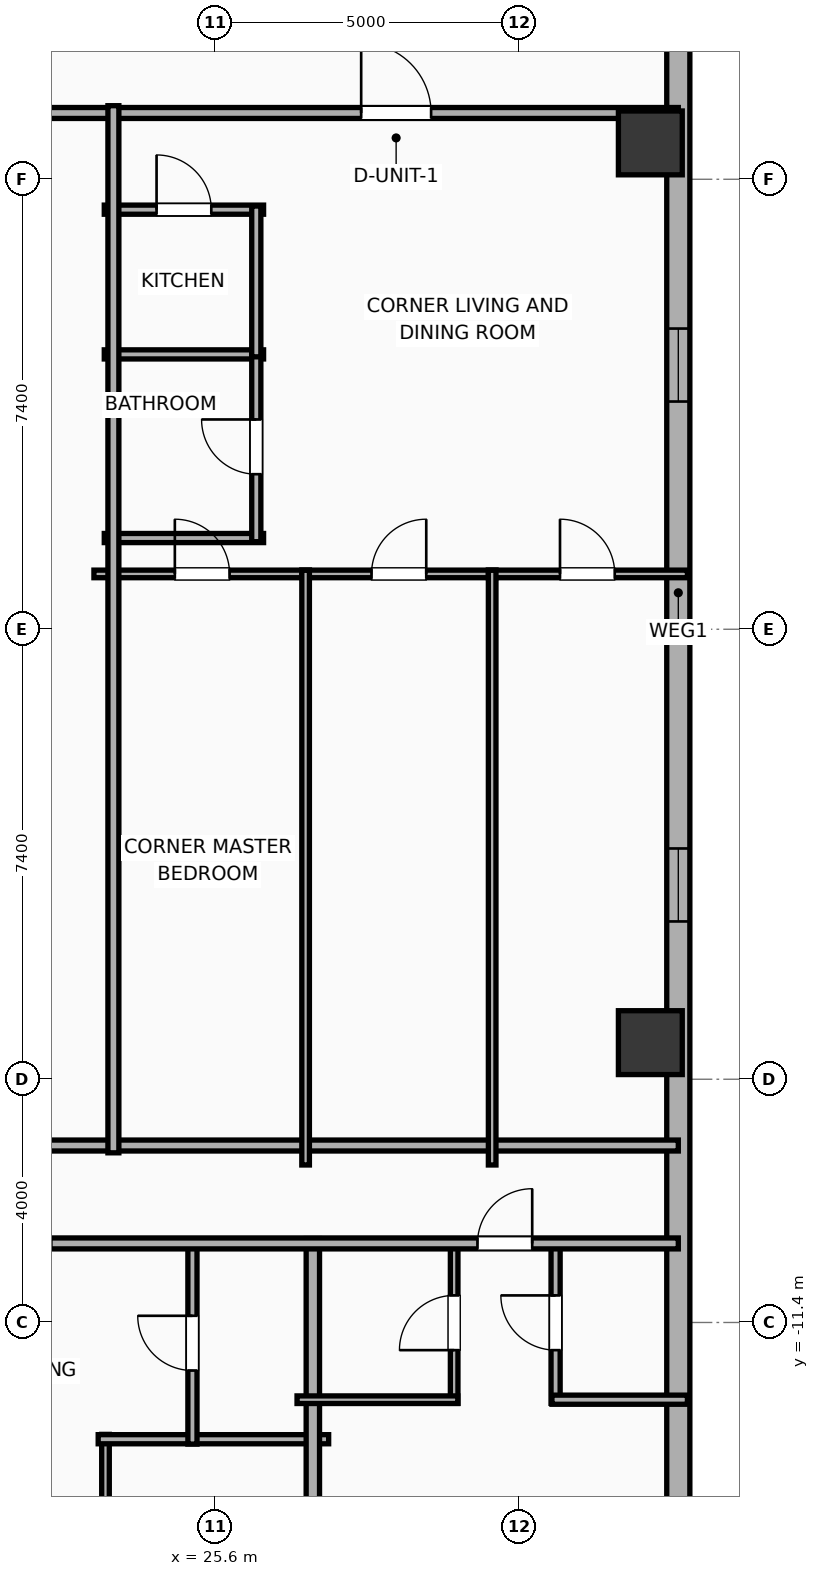
"""IFC4 building model, lengths in metres.
Left out: names, types, materials, properties, quantities, classifications, styles, units other than length and angle.
Written with IfcOpenShell. Run it as: python <this file> out.ifc"""

import sys

from ifc_helpers import new_model, si_unit, direction, frame, frame_2d, origin, origin_2d, place, context, subcontext, project, spatial, rectangle, hollow_rectangle, extrude, element, fill, save


model = new_model("IFC4")
c1 = context("Model", 3, precision=1e-05, world=origin(), true_north=direction((0.0, 1.0)))
c2 = subcontext(c1, "Body", "Model", "MODEL_VIEW")
j1 = project(units=[si_unit("LENGTHUNIT", "METRE"), si_unit("PLANEANGLEUNIT", "RADIAN")], contexts=[c1])
p1 = place(None, origin())
s1 = spatial("IfcSite", under=j1, at=p1, CompositionType="ELEMENT")
p2 = place(p1, origin())
s2 = spatial("IfcBuilding", under=s1, at=p2, CompositionType="ELEMENT")
p3 = place(p2, frame((0.0, 0.0, 97.5)))
s3 = spatial("IfcBuildingStorey", under=s2, at=p3, CompositionType="ELEMENT", Elevation=97.5)
for number, where, z_axis, x_axis in (
    (1, (32.75, -6.798, 0.0), (0.0, 0.0, 1.0), (1.0, 0.0, 0.0)),
    (2, (32.75, 7.998, 0.0), (0.0, 0.0, 1.0), (1.0, 0.0, 0.0)),
):
    element("IfcColumn", number, at=place(p3, frame(where, z_axis=z_axis, x_axis=x_axis)), inside=s3, PredefinedType="COLUMN", context=c2, shape_type="SweptSolid", body=[
        extrude(hollow_rectangle(XDim=1.05, YDim=1.05, WallThickness=0.036, at=origin_2d()), origin(), (0.0, 0.0, 1.0), 3.9),
    ])
p4 = place(p3, frame((33.21, 17.781, 0.0), z_axis=(0.0, 0.0, 1.0), x_axis=(0.0, -1.0, 0.0)))
e3 = element("IfcWall", 3, at=p4, inside=s3, PredefinedType="ELEMENTEDWALL", context=c2, shape_type="SweptSolid", body=[
    extrude(rectangle(XDim=34.363, YDim=0.38, at=frame_2d((17.181, 0.0))), origin(), (0.0, 0.0, 1.0), 3.65),
])
p5 = place(p4, frame((12.836, 0.0, 0.75)))
e4 = element("IfcOpeningElement", 4, at=p5, cuts=e3, PredefinedType="OPENING", context=c2, shape_type="SweptSolid", body=[
    extrude(rectangle(XDim=1.2, YDim=2.05, at=frame_2d((0.6, 1.025))), frame((0.0, 0.2, 0.0), z_axis=(0.0, -1.0, 0.0), x_axis=(1.0, 0.0, 0.0)), (0.0, 0.0, 1.0), 0.4),
])
p6 = place(p4, frame((21.386, 0.0, 0.75)))
e5 = element("IfcOpeningElement", 5, at=p6, cuts=e3, PredefinedType="OPENING", context=c2, shape_type="SweptSolid", body=[
    extrude(rectangle(XDim=1.2, YDim=2.05, at=frame_2d((0.6, 1.025))), frame((0.0, 0.2, 0.0), z_axis=(0.0, -1.0, 0.0), x_axis=(1.0, 0.0, 0.0)), (0.0, 0.0, 1.0), 0.4),
])
p7 = place(p3, frame((9.88, 8.49, 0.0), z_axis=(0.0, 0.0, 1.0), x_axis=(1.0, 0.0, 0.0)))
e6 = element("IfcWall", 6, at=p7, inside=s3, PredefinedType="PARTITIONING", context=c2, shape_type="SweptSolid", body=[
    extrude(rectangle(XDim=23.33, YDim=0.18, at=frame_2d((11.665, 0.0))), origin(), (0.0, 0.0, 1.0), 3.65),
])
p8 = place(p7, frame((18.115, 0.0, 0.0)))
e7 = element("IfcOpeningElement", 7, at=p8, cuts=e6, PredefinedType="OPENING", context=c2, shape_type="SweptSolid", body=[
    extrude(rectangle(XDim=1.15, YDim=2.05, at=frame_2d((0.575, 1.025))), frame((0.0, 0.1, 0.0), z_axis=(0.0, -1.0, 0.0), x_axis=(1.0, 0.0, 0.0)), (0.0, 0.0, 1.0), 0.2),
])
p9 = place(p3, frame((9.88, -8.49, 0.0), z_axis=(0.0, 0.0, 1.0), x_axis=(1.0, 0.0, 0.0)))
e8 = element("IfcWall", 8, at=p9, inside=s3, PredefinedType="PARTITIONING", context=c2, shape_type="SweptSolid", body=[
    extrude(rectangle(XDim=23.33, YDim=0.18, at=frame_2d((11.665, 0.0))), origin(), (0.0, 0.0, 1.0), 3.65),
])
p10 = place(p3, frame((23.79, -20.56, 0.0), z_axis=(0.0, 0.0, 1.0), x_axis=(0.0, 1.0, 0.0)))
e9 = element("IfcWall", 9, at=p10, inside=s3, PredefinedType="PARTITIONING", context=c2, shape_type="SweptSolid", body=[
    extrude(rectangle(XDim=7.32, YDim=0.125, at=frame_2d((3.66, 0.0))), origin(), (0.0, 0.0, 1.0), 3.65),
])
p11 = place(p10, frame((5.113, 0.0, 0.0)))
e10 = element("IfcOpeningElement", 10, at=p11, cuts=e9, PredefinedType="OPENING", context=c2, shape_type="SweptSolid", body=[
    extrude(rectangle(XDim=0.9, YDim=2.05, at=frame_2d((0.45, 1.025))), frame((0.0, 0.073, 0.0), z_axis=(0.0, -1.0, 0.0), x_axis=(1.0, 0.0, 0.0)), (0.0, 0.0, 1.0), 0.145),
])
p12 = place(p3, frame((23.67, -13.32, 0.0), z_axis=(0.0, 0.0, 1.0), x_axis=(1.0, 0.0, 0.0)))
e11 = element("IfcWall", 11, at=p12, inside=s3, PredefinedType="PLUMBINGWALL", context=c2, shape_type="SweptSolid", body=[
    extrude(rectangle(XDim=3.79, YDim=0.15, at=frame_2d((1.895, 0.0))), origin(), (0.0, 0.0, 1.0), 3.65),
])
p13 = place(p3, frame((25.22, -13.4, 0.0), z_axis=(0.0, 0.0, 1.0), x_axis=(0.0, 1.0, 0.0)))
e12 = element("IfcWall", 12, at=p13, inside=s3, PredefinedType="PLUMBINGWALL", context=c2, shape_type="SweptSolid", body=[
    extrude(rectangle(XDim=3.32, YDim=0.15, at=frame_2d((1.66, 0.0))), origin(), (0.0, 0.0, 1.0), 3.65),
])
p14 = place(p13, frame((1.21, 0.0, 0.0)))
e13 = element("IfcOpeningElement", 13, at=p14, cuts=e12, PredefinedType="OPENING", context=c2, shape_type="SweptSolid", body=[
    extrude(rectangle(XDim=0.9, YDim=2.05, at=frame_2d((0.45, 1.025))), frame((0.0, 0.085, 0.0), z_axis=(0.0, -1.0, 0.0), x_axis=(1.0, 0.0, 0.0)), (0.0, 0.0, 1.0), 0.17),
])
p15 = place(p3, frame((27.2, -20.41, 0.0), z_axis=(0.0, 0.0, 1.0), x_axis=(0.0, 1.0, 0.0)))
e14 = element("IfcWall", 14, at=p15, inside=s3, PredefinedType="PARTITIONING", context=c2, shape_type="SweptSolid", body=[
    extrude(rectangle(XDim=10.39, YDim=0.22, at=frame_2d((5.195, 0.0))), origin(), (0.0, 0.0, 1.0), 3.65),
])
p16 = place(p3, frame((29.524, -12.73, 0.0), z_axis=(0.0, 0.0, 1.0), x_axis=(0.0, 1.0, 0.0)))
e15 = element("IfcWall", 15, at=p16, inside=s3, PredefinedType="PARTITIONING", context=c2, shape_type="SweptSolid", body=[
    extrude(rectangle(XDim=2.65, YDim=0.125, at=frame_2d((1.325, 0.0))), origin(), (0.0, 0.0, 1.0), 3.65),
])
p17 = place(p16, frame((0.875, 0.0, 0.0)))
e16 = element("IfcOpeningElement", 16, at=p17, cuts=e15, PredefinedType="OPENING", context=c2, shape_type="SweptSolid", body=[
    extrude(rectangle(XDim=0.9, YDim=2.05, at=frame_2d((0.45, 1.025))), frame((0.0, 0.073, 0.0), z_axis=(0.0, -1.0, 0.0), x_axis=(1.0, 0.0, 0.0)), (0.0, 0.0, 1.0), 0.145),
])
p18 = place(p3, frame((31.192, -12.73, 0.0), z_axis=(0.0, 0.0, 1.0), x_axis=(0.0, 1.0, 0.0)))
e17 = element("IfcWall", 17, at=p18, inside=s3, PredefinedType="PLUMBINGWALL", context=c2, shape_type="SweptSolid", body=[
    extrude(rectangle(XDim=2.65, YDim=0.15, at=frame_2d((1.325, 0.0))), origin(), (0.0, 0.0, 1.0), 3.65),
])
p19 = place(p18, frame((0.875, 0.0, 0.0)))
e18 = element("IfcOpeningElement", 18, at=p19, cuts=e17, PredefinedType="OPENING", context=c2, shape_type="SweptSolid", body=[
    extrude(rectangle(XDim=0.9, YDim=2.05, at=frame_2d((0.45, 1.025))), frame((0.0, 0.085, 0.0), z_axis=(0.0, -1.0, 0.0), x_axis=(1.0, 0.0, 0.0)), (0.0, 0.0, 1.0), 0.17),
])
p20 = place(p3, frame((26.94, -12.67, 0.0), z_axis=(0.0, 0.0, 1.0), x_axis=(1.0, 0.0, 0.0)))
e19 = element("IfcWall", 19, at=p20, inside=s3, PredefinedType="PARTITIONING", context=c2, shape_type="SweptSolid", body=[
    extrude(rectangle(XDim=2.644, YDim=0.125, at=frame_2d((1.322, 0.0))), origin(), (0.0, 0.0, 1.0), 3.65),
])
p21 = place(p3, frame((31.132, -12.67, 0.0), z_axis=(0.0, 0.0, 1.0), x_axis=(1.0, 0.0, 0.0)))
e20 = element("IfcWall", 20, at=p21, inside=s3, PredefinedType="PLUMBINGWALL", context=c2, shape_type="SweptSolid", body=[
    extrude(rectangle(XDim=2.228, YDim=0.15, at=frame_2d((1.114, 0.0))), origin(), (0.0, 0.0, 1.0), 3.65),
])
p22 = place(p3, frame((-29.21, -10.1, 0.0), z_axis=(0.0, 0.0, 1.0), x_axis=(1.0, 0.0, 0.0)))
e21 = element("IfcWall", 21, at=p22, inside=s3, PredefinedType="PARTITIONING", context=c2, shape_type="SweptSolid", body=[
    extrude(rectangle(XDim=62.42, YDim=0.18, at=frame_2d((31.21, 0.0))), origin(), (0.0, 0.0, 1.0), 3.65),
])
p23 = place(p22, frame((3.033, 0.0, 0.0)))
e22 = element("IfcOpeningElement", 22, at=p23, cuts=e21, PredefinedType="OPENING", context=c2, shape_type="SweptSolid", body=[
    extrude(rectangle(XDim=0.9, YDim=2.05, at=frame_2d((0.45, 1.025))), frame((0.0, 0.1, 0.0), z_axis=(0.0, -1.0, 0.0), x_axis=(1.0, 0.0, 0.0)), (0.0, 0.0, 1.0), 0.2),
])
p24 = place(p22, frame((9.768, 0.0, 0.0)))
e23 = element("IfcOpeningElement", 23, at=p24, cuts=e21, PredefinedType="OPENING", context=c2, shape_type="SweptSolid", body=[
    extrude(rectangle(XDim=0.9, YDim=2.05, at=frame_2d((0.45, 1.025))), frame((0.0, 0.1, 0.0), z_axis=(0.0, -1.0, 0.0), x_axis=(1.0, 0.0, 0.0)), (0.0, 0.0, 1.0), 0.2),
])
p25 = place(p22, frame((18.65, 0.0, 0.0)))
e24 = element("IfcOpeningElement", 24, at=p25, cuts=e21, PredefinedType="OPENING", context=c2, shape_type="SweptSolid", body=[
    extrude(rectangle(XDim=1.15, YDim=2.05, at=frame_2d((0.575, 1.025))), frame((0.0, 0.1, 0.0), z_axis=(0.0, -1.0, 0.0), x_axis=(1.0, 0.0, 0.0)), (0.0, 0.0, 1.0), 0.2),
])
p26 = place(p22, frame((29.212, 0.0, 0.0)))
e25 = element("IfcOpeningElement", 25, at=p26, cuts=e21, PredefinedType="OPENING", context=c2, shape_type="SweptSolid", body=[
    extrude(rectangle(XDim=1.15, YDim=2.05, at=frame_2d((0.575, 1.025))), frame((0.0, 0.1, 0.0), z_axis=(0.0, -1.0, 0.0), x_axis=(1.0, 0.0, 0.0)), (0.0, 0.0, 1.0), 0.2),
])
p27 = place(p22, frame((40.379, 0.0, 0.0)))
e26 = element("IfcOpeningElement", 26, at=p27, cuts=e21, PredefinedType="OPENING", context=c2, shape_type="SweptSolid", body=[
    extrude(rectangle(XDim=1.15, YDim=2.05, at=frame_2d((0.575, 1.025))), frame((0.0, 0.1, 0.0), z_axis=(0.0, -1.0, 0.0), x_axis=(1.0, 0.0, 0.0)), (0.0, 0.0, 1.0), 0.2),
])
p28 = place(p22, frame((50.959, 0.0, 0.0)))
e27 = element("IfcOpeningElement", 27, at=p28, cuts=e21, PredefinedType="OPENING", context=c2, shape_type="SweptSolid", body=[
    extrude(rectangle(XDim=1.15, YDim=2.05, at=frame_2d((0.575, 1.025))), frame((0.0, 0.1, 0.0), z_axis=(0.0, -1.0, 0.0), x_axis=(1.0, 0.0, 0.0)), (0.0, 0.0, 1.0), 0.2),
])
p29 = place(p22, frame((59.117, 0.0, 0.0)))
e28 = element("IfcOpeningElement", 28, at=p29, cuts=e21, PredefinedType="OPENING", context=c2, shape_type="SweptSolid", body=[
    extrude(rectangle(XDim=0.9, YDim=2.05, at=frame_2d((0.45, 1.025))), frame((0.0, 0.1, 0.0), z_axis=(0.0, -1.0, 0.0), x_axis=(1.0, 0.0, 0.0)), (0.0, 0.0, 1.0), 0.2),
])
p30 = place(p3, frame((23.77, 6.9, 0.0), z_axis=(0.0, 0.0, 1.0), x_axis=(1.0, 0.0, 0.0)))
e29 = element("IfcWall", 29, at=p30, inside=s3, PredefinedType="PLUMBINGWALL", context=c2, shape_type="SweptSolid", body=[
    extrude(rectangle(XDim=2.62, YDim=0.15, at=frame_2d((1.31, 0.0))), origin(), (0.0, 0.0, 1.0), 3.65),
])
p31 = place(p30, frame((0.86, 0.0, 0.0)))
e30 = element("IfcOpeningElement", 30, at=p31, cuts=e29, PredefinedType="OPENING", context=c2, shape_type="SweptSolid", body=[
    extrude(rectangle(XDim=0.9, YDim=2.05, at=frame_2d((0.45, 1.025))), frame((0.0, 0.085, 0.0), z_axis=(0.0, -1.0, 0.0), x_axis=(1.0, 0.0, 0.0)), (0.0, 0.0, 1.0), 0.17),
])
for number, where, z_axis, x_axis in (
    (31, (23.77, 4.52, 0.0), (0.0, 0.0, 1.0), (1.0, 0.0, 0.0)),
    (32, (23.77, 1.5, 0.0), (0.0, 0.0, 1.0), (1.0, 0.0, 0.0)),
):
    element("IfcWall", number, at=place(p3, frame(where, z_axis=z_axis, x_axis=x_axis)), inside=s3, PredefinedType="PLUMBINGWALL", context=c2, shape_type="SweptSolid", body=[
        extrude(rectangle(XDim=2.62, YDim=0.15, at=frame_2d((1.31, 0.0))), origin(), (0.0, 0.0, 1.0), 3.65),
    ])
p32 = place(p3, frame((26.27, 1.44, 0.0), z_axis=(0.0, 0.0, 1.0), x_axis=(0.0, 1.0, 0.0)))
e33 = element("IfcWall", 33, at=p32, inside=s3, PredefinedType="PLUMBINGWALL", context=c2, shape_type="SweptSolid", body=[
    extrude(rectangle(XDim=3.12, YDim=0.15, at=frame_2d((1.56, 0.0))), origin(), (0.0, 0.0, 1.0), 3.65),
])
p33 = place(p32, frame((1.11, 0.0, 0.0)))
e34 = element("IfcOpeningElement", 34, at=p33, cuts=e33, PredefinedType="OPENING", context=c2, shape_type="SweptSolid", body=[
    extrude(rectangle(XDim=0.9, YDim=2.05, at=frame_2d((0.45, 1.025))), frame((0.0, 0.085, 0.0), z_axis=(0.0, -1.0, 0.0), x_axis=(1.0, 0.0, 0.0)), (0.0, 0.0, 1.0), 0.17),
])
p34 = place(p3, frame((26.27, 4.48, 0.0), z_axis=(0.0, 0.0, 1.0), x_axis=(0.0, 1.0, 0.0)))
e35 = element("IfcWall", 35, at=p34, inside=s3, PredefinedType="PLUMBINGWALL", context=c2, shape_type="SweptSolid", body=[
    extrude(rectangle(XDim=2.48, YDim=0.15, at=frame_2d((1.24, 0.0))), origin(), (0.0, 0.0, 1.0), 3.65),
])
p35 = place(p3, frame((23.6, 0.91, 0.0), z_axis=(0.0, 0.0, 1.0), x_axis=(1.0, 0.0, 0.0)))
e36 = element("IfcWall", 36, at=p35, inside=s3, PredefinedType="PARTITIONING", context=c2, shape_type="SweptSolid", body=[
    extrude(rectangle(XDim=3.543, YDim=0.125, at=frame_2d((1.772, 0.0))), origin(), (0.0, 0.0, 1.0), 3.65),
])
p36 = place(p35, frame((1.331, 0.0, 0.0)))
e37 = element("IfcOpeningElement", 37, at=p36, cuts=e36, PredefinedType="OPENING", context=c2, shape_type="SweptSolid", body=[
    extrude(rectangle(XDim=0.9, YDim=2.05, at=frame_2d((0.45, 1.025))), frame((0.0, 0.073, 0.0), z_axis=(0.0, -1.0, 0.0), x_axis=(1.0, 0.0, 0.0)), (0.0, 0.0, 1.0), 0.145),
])
p37 = place(p3, frame((27.019, 0.91, 0.0), z_axis=(0.0, 0.0, 1.0), x_axis=(1.0, 0.0, 0.0)))
e38 = element("IfcWall", 38, at=p37, inside=s3, PredefinedType="PARTITIONING", context=c2, shape_type="SweptSolid", body=[
    extrude(rectangle(XDim=3.193, YDim=0.125, at=frame_2d((1.596, 0.0))), origin(), (0.0, 0.0, 1.0), 3.65),
])
p38 = place(p37, frame((1.146, 0.0, 0.0)))
e39 = element("IfcOpeningElement", 39, at=p38, cuts=e38, PredefinedType="OPENING", context=c2, shape_type="SweptSolid", body=[
    extrude(rectangle(XDim=0.9, YDim=2.05, at=frame_2d((0.45, 1.025))), frame((0.0, 0.073, 0.0), z_axis=(0.0, -1.0, 0.0), x_axis=(1.0, 0.0, 0.0)), (0.0, 0.0, 1.0), 0.145),
])
p39 = place(p3, frame((30.086, 0.91, 0.0), z_axis=(0.0, 0.0, 1.0), x_axis=(1.0, 0.0, 0.0)))
e40 = element("IfcWall", 40, at=p39, inside=s3, PredefinedType="PARTITIONING", context=c2, shape_type="SweptSolid", body=[
    extrude(rectangle(XDim=3.274, YDim=0.125, at=frame_2d((1.637, 0.0))), origin(), (0.0, 0.0, 1.0), 3.65),
])
p40 = place(p39, frame((1.178, 0.0, 0.0)))
e41 = element("IfcOpeningElement", 41, at=p40, cuts=e40, PredefinedType="OPENING", context=c2, shape_type="SweptSolid", body=[
    extrude(rectangle(XDim=0.9, YDim=2.05, at=frame_2d((0.45, 1.025))), frame((0.0, 0.073, 0.0), z_axis=(0.0, -1.0, 0.0), x_axis=(1.0, 0.0, 0.0)), (0.0, 0.0, 1.0), 0.145),
])
for number, where, z_axis, x_axis in (
    (42, (30.149, -8.81, 0.0), (0.0, 0.0, 1.0), (0.0, 1.0, 0.0)),
    (43, (27.081, -8.81, 0.0), (0.0, 0.0, 1.0), (0.0, 1.0, 0.0)),
):
    element("IfcWall", number, at=place(p3, frame(where, z_axis=z_axis, x_axis=x_axis)), inside=s3, PredefinedType="PARTITIONING", context=c2, shape_type="SweptSolid", body=[
        extrude(rectangle(XDim=9.78, YDim=0.125, at=frame_2d((4.89, 0.0))), origin(), (0.0, 0.0, 1.0), 3.65),
    ])
p41 = place(p3, frame((23.92, -8.61, 0.0), z_axis=(0.0, 0.0, 1.0), x_axis=(0.0, 1.0, 0.0)))
e44 = element("IfcWall", 44, at=p41, inside=s3, PredefinedType="PARTITIONING", context=c2, shape_type="SweptSolid", body=[
    extrude(rectangle(XDim=17.22, YDim=0.18, at=frame_2d((8.61, 0.0))), origin(), (0.0, 0.0, 1.0), 3.65),
])
p42 = place(p5, origin())
e45 = element("IfcWindow", 45, at=p42, inside=s3, PartitioningType="SINGLE_PANEL", PredefinedType="WINDOW", context=c2, shape_type="SweptSolid", body=[
    extrude(rectangle(XDim=1.2, YDim=2.05, at=frame_2d((0.6, 1.025))), frame((0.0, 0.03, 0.0), z_axis=(0.0, -1.0, 0.0), x_axis=(1.0, 0.0, 0.0)), (0.0, 0.0, 1.0), 0.06),
])
fill(e4, e45)
p43 = place(p6, origin())
e46 = element("IfcWindow", 46, at=p43, inside=s3, PartitioningType="SINGLE_PANEL", PredefinedType="WINDOW", context=c2, shape_type="SweptSolid", body=[
    extrude(rectangle(XDim=1.2, YDim=2.05, at=frame_2d((0.6, 1.025))), frame((0.0, 0.03, 0.0), z_axis=(0.0, -1.0, 0.0), x_axis=(1.0, 0.0, 0.0)), (0.0, 0.0, 1.0), 0.06),
])
fill(e5, e46)
p44 = place(p8, origin())
e47 = element("IfcDoor", 47, at=p44, inside=s3, OperationType="SINGLE_SWING_LEFT", PredefinedType="DOOR", context=c2, shape_type="SweptSolid", body=[
    extrude(rectangle(XDim=1.15, YDim=2.05, at=frame_2d((0.575, 1.025))), frame((0.0, 0.025, 0.0), z_axis=(0.0, -1.0, 0.0), x_axis=(1.0, 0.0, 0.0)), (0.0, 0.0, 1.0), 0.05),
])
fill(e7, e47)
p45 = place(p14, origin())
e48 = element("IfcDoor", 48, at=p45, inside=s3, OperationType="SINGLE_SWING_RIGHT", PredefinedType="DOOR", context=c2, shape_type="SweptSolid", body=[
    extrude(rectangle(XDim=0.9, YDim=2.05, at=frame_2d((0.45, 1.025))), frame((0.0, 0.025, 0.0), z_axis=(0.0, -1.0, 0.0), x_axis=(1.0, 0.0, 0.0)), (0.0, 0.0, 1.0), 0.05),
])
fill(e13, e48)
p46 = place(p17, origin())
e49 = element("IfcDoor", 49, at=p46, inside=s3, OperationType="SINGLE_SWING_LEFT", PredefinedType="DOOR", context=c2, shape_type="SweptSolid", body=[
    extrude(rectangle(XDim=0.9, YDim=2.05, at=frame_2d((0.45, 1.025))), frame((0.0, 0.025, 0.0), z_axis=(0.0, -1.0, 0.0), x_axis=(1.0, 0.0, 0.0)), (0.0, 0.0, 1.0), 0.05),
])
fill(e16, e49)
p47 = place(p19, origin())
e50 = element("IfcDoor", 50, at=p47, inside=s3, OperationType="SINGLE_SWING_RIGHT", PredefinedType="DOOR", context=c2, shape_type="SweptSolid", body=[
    extrude(rectangle(XDim=0.9, YDim=2.05, at=frame_2d((0.45, 1.025))), frame((0.0, 0.025, 0.0), z_axis=(0.0, -1.0, 0.0), x_axis=(1.0, 0.0, 0.0)), (0.0, 0.0, 1.0), 0.05),
])
fill(e18, e50)
p48 = place(p29, origin())
e51 = element("IfcDoor", 51, at=p48, inside=s3, OperationType="SINGLE_SWING_RIGHT", PredefinedType="DOOR", context=c2, shape_type="SweptSolid", body=[
    extrude(rectangle(XDim=0.9, YDim=2.05, at=frame_2d((0.45, 1.025))), frame((0.0, 0.025, 0.0), z_axis=(0.0, -1.0, 0.0), x_axis=(1.0, 0.0, 0.0)), (0.0, 0.0, 1.0), 0.05),
])
fill(e28, e51)
p49 = place(p31, origin())
e52 = element("IfcDoor", 52, at=p49, inside=s3, OperationType="SINGLE_SWING_LEFT", PredefinedType="DOOR", context=c2, shape_type="SweptSolid", body=[
    extrude(rectangle(XDim=0.9, YDim=2.05, at=frame_2d((0.45, 1.025))), frame((0.0, 0.025, 0.0), z_axis=(0.0, -1.0, 0.0), x_axis=(1.0, 0.0, 0.0)), (0.0, 0.0, 1.0), 0.05),
])
fill(e30, e52)
p50 = place(p33, origin())
e53 = element("IfcDoor", 53, at=p50, inside=s3, OperationType="SINGLE_SWING_RIGHT", PredefinedType="DOOR", context=c2, shape_type="SweptSolid", body=[
    extrude(rectangle(XDim=0.9, YDim=2.05, at=frame_2d((0.45, 1.025))), frame((0.0, 0.025, 0.0), z_axis=(0.0, -1.0, 0.0), x_axis=(1.0, 0.0, 0.0)), (0.0, 0.0, 1.0), 0.05),
])
fill(e34, e53)
p51 = place(p36, origin())
e54 = element("IfcDoor", 54, at=p51, inside=s3, OperationType="SINGLE_SWING_LEFT", PredefinedType="DOOR", context=c2, shape_type="SweptSolid", body=[
    extrude(rectangle(XDim=0.9, YDim=2.05, at=frame_2d((0.45, 1.025))), frame((0.0, 0.025, 0.0), z_axis=(0.0, -1.0, 0.0), x_axis=(1.0, 0.0, 0.0)), (0.0, 0.0, 1.0), 0.05),
])
fill(e37, e54)
p52 = place(p38, origin())
e55 = element("IfcDoor", 55, at=p52, inside=s3, OperationType="SINGLE_SWING_RIGHT", PredefinedType="DOOR", context=c2, shape_type="SweptSolid", body=[
    extrude(rectangle(XDim=0.9, YDim=2.05, at=frame_2d((0.45, 1.025))), frame((0.0, 0.025, 0.0), z_axis=(0.0, -1.0, 0.0), x_axis=(1.0, 0.0, 0.0)), (0.0, 0.0, 1.0), 0.05),
])
fill(e39, e55)
p53 = place(p40, origin())
e56 = element("IfcDoor", 56, at=p53, inside=s3, OperationType="SINGLE_SWING_LEFT", PredefinedType="DOOR", context=c2, shape_type="SweptSolid", body=[
    extrude(rectangle(XDim=0.9, YDim=2.05, at=frame_2d((0.45, 1.025))), frame((0.0, 0.025, 0.0), z_axis=(0.0, -1.0, 0.0), x_axis=(1.0, 0.0, 0.0)), (0.0, 0.0, 1.0), 0.05),
])
fill(e41, e56)
save(model, sys.argv[1])
